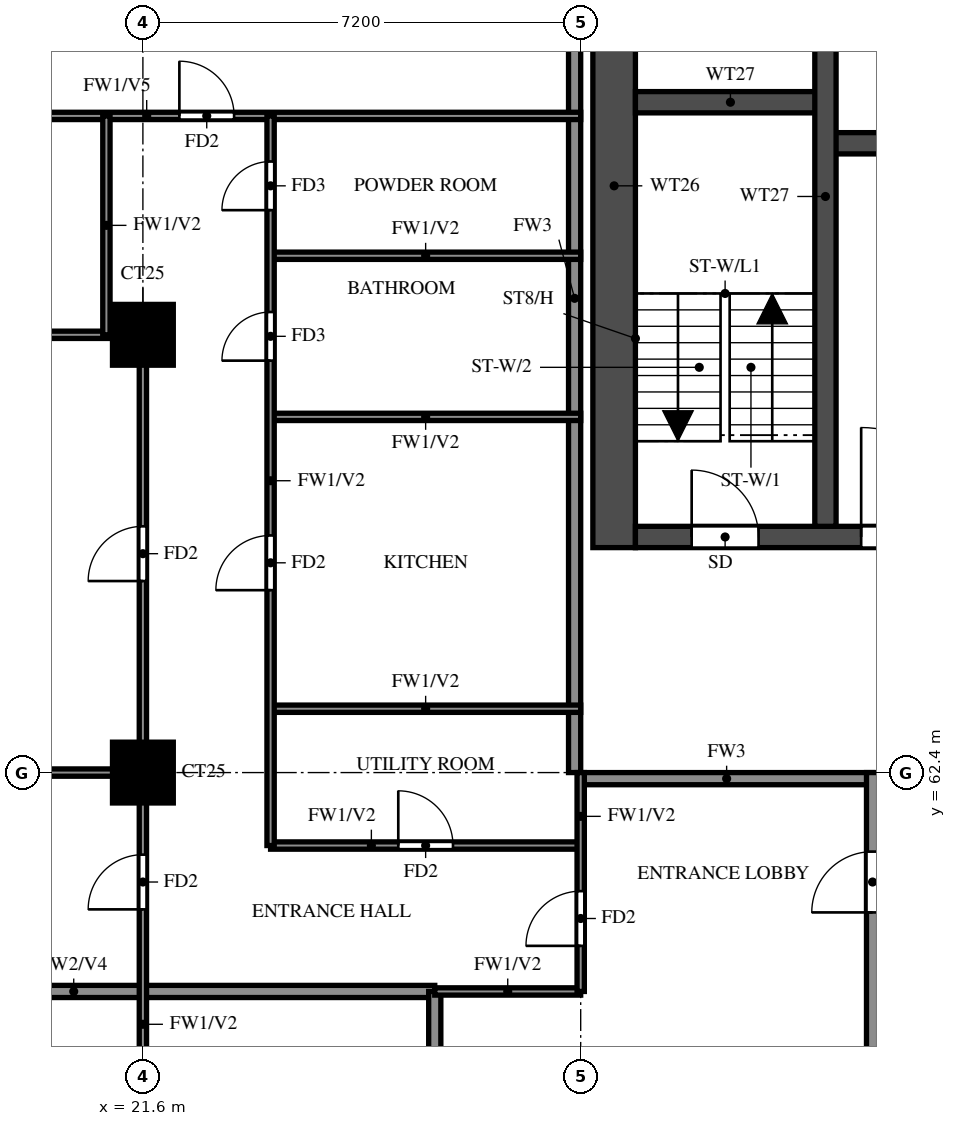
"""IFC4 building model, lengths in metres.
Left out: names, types, materials, properties, quantities, classifications, styles, units other than length and angle.
Written with IfcOpenShell. Run it as: python <this file> out.ifc"""

import sys

from ifc_helpers import new_model, si_unit, direction, frame, frame_2d, origin, origin_2d, place, context, subcontext, project, spatial, rectangle, extrude, source, transform, mapped, element, fill, save


model = new_model("IFC4")
c1 = context("Model", 3, precision=1e-05, world=origin(), true_north=direction((0.0, 1.0)))
c2 = subcontext(c1, "Body", "Model", "MODEL_VIEW")
j1 = project(units=[si_unit("LENGTHUNIT", "METRE"), si_unit("PLANEANGLEUNIT", "RADIAN")], contexts=[c1])
p1 = place(None, origin())
s1 = spatial("IfcSite", under=j1, at=p1, CompositionType="ELEMENT")
p2 = place(p1, origin())
s2 = spatial("IfcBuilding", under=s1, at=p2, CompositionType="ELEMENT")
p3 = place(p2, frame((0.0, 0.0, 160.5)))
s3 = spatial("IfcBuildingStorey", under=s2, at=p3, CompositionType="ELEMENT", Elevation=160.5)
m1 = source(origin(), c2, "Body", "SweptSolid", [
    extrude(rectangle(XDim=1.0, YDim=1.0, at=origin_2d()), origin(), (0.0, 0.0, 1.0), 3.2),
])
for number, where, z_axis, x_axis in (
    (1, (21.6, 62.4, 0.0), (0.0, 0.0, 1.0), (1.0, 0.0, 0.0)),
    (2, (21.6, 69.6, 0.0), (0.0, 0.0, 1.0), (1.0, 0.0, 0.0)),
):
    element("IfcColumn", number, at=place(p3, frame(where, z_axis=z_axis, x_axis=x_axis)), inside=s3, PredefinedType="COLUMN", context=c2, shape_type="MappedRepresentation", body=[
        mapped(m1, transform((0.0, 0.0, 0.0))),
    ])
p4 = place(p3, frame((29.35, 66.1, 0.0), z_axis=(0.0, 0.0, 1.0), x_axis=(0.0, 1.0, 0.0)))
e3 = element("IfcWall", 3, at=p4, inside=s3, PredefinedType="SHEAR", context=c2, shape_type="SweptSolid", body=[
    extrude(rectangle(XDim=11.9, YDim=0.7, at=frame_2d((5.95, 0.0))), origin(), (0.0, 0.0, 1.0), 3.2),
])
p5 = place(p3, frame((29.7, 66.275, 0.0), z_axis=(0.0, 0.0, 1.0), x_axis=(1.0, 0.0, 0.0)))
e4 = element("IfcWall", 4, at=p5, inside=s3, PredefinedType="SHEAR", context=c2, shape_type="SweptSolid", body=[
    extrude(rectangle(XDim=41.4, YDim=0.35, at=frame_2d((20.7, 0.0))), origin(), (0.0, 0.0, 1.0), 3.2),
])
p6 = place(p5, frame((0.925, 0.0, 0.0)))
e5 = element("IfcOpeningElement", 5, at=p6, cuts=e4, PredefinedType="OPENING", context=c2, shape_type="SweptSolid", body=[
    extrude(rectangle(XDim=1.1, YDim=2.1, at=frame_2d((0.55, 1.05))), frame((0.0, 0.185, 0.0), z_axis=(0.0, -1.0, 0.0), x_axis=(1.0, 0.0, 0.0)), (0.0, 0.0, 1.0), 0.37),
])
p7 = place(p5, frame((3.712, 0.0, 0.0)))
e6 = element("IfcOpeningElement", 6, at=p7, cuts=e4, PredefinedType="OPENING", context=c2, shape_type="SweptSolid", body=[
    extrude(rectangle(XDim=1.8, YDim=2.1, at=frame_2d((0.9, 1.05))), frame((0.0, 0.185, 0.0), z_axis=(0.0, -1.0, 0.0), x_axis=(1.0, 0.0, 0.0)), (0.0, 0.0, 1.0), 0.37),
])
p8 = place(p3, frame((32.825, 72.75, 0.0), z_axis=(0.0, 0.0, 1.0), x_axis=(1.0, 0.0, 0.0)))
e7 = element("IfcWall", 7, at=p8, inside=s3, PredefinedType="SHEAR", context=c2, shape_type="SweptSolid", body=[
    extrude(rectangle(XDim=35.15, YDim=0.35, at=frame_2d((17.575, 0.0))), origin(), (0.0, 0.0, 1.0), 3.2),
])
p9 = place(p8, frame((19.8, 0.0, 0.0)))
e8 = element("IfcOpeningElement", 8, at=p9, cuts=e7, PredefinedType="OPENING", context=c2, shape_type="SweptSolid", body=[
    extrude(rectangle(XDim=1.1, YDim=2.1, at=frame_2d((0.55, 1.05))), frame((0.0, 0.185, 0.0), z_axis=(0.0, -1.0, 0.0), x_axis=(1.0, 0.0, 0.0)), (0.0, 0.0, 1.0), 0.37),
])
p10 = place(p8, frame((27.7, 0.0, 0.0)))
e9 = element("IfcOpeningElement", 9, at=p10, cuts=e7, PredefinedType="OPENING", context=c2, shape_type="SweptSolid", body=[
    extrude(rectangle(XDim=1.1, YDim=2.1, at=frame_2d((0.55, 1.05))), frame((0.0, 0.185, 0.0), z_axis=(0.0, -1.0, 0.0), x_axis=(1.0, 0.0, 0.0)), (0.0, 0.0, 1.0), 0.37),
])
p11 = place(p8, frame((30.3, 0.0, 0.0)))
e10 = element("IfcOpeningElement", 10, at=p11, cuts=e7, PredefinedType="OPENING", context=c2, shape_type="SweptSolid", body=[
    extrude(rectangle(XDim=1.1, YDim=2.1, at=frame_2d((0.55, 1.05))), frame((0.0, 0.185, 0.0), z_axis=(0.0, -1.0, 0.0), x_axis=(1.0, 0.0, 0.0)), (0.0, 0.0, 1.0), 0.37),
])
p12 = place(p8, frame((3.8, 0.0, 0.0)))
e11 = element("IfcOpeningElement", 11, at=p12, cuts=e7, PredefinedType="OPENING", context=c2, shape_type="SweptSolid", body=[
    extrude(rectangle(XDim=1.1, YDim=2.1, at=frame_2d((0.55, 1.05))), frame((0.0, 0.185, 0.0), z_axis=(0.0, -1.0, 0.0), x_axis=(1.0, 0.0, 0.0)), (0.0, 0.0, 1.0), 0.37),
])
p13 = place(p8, frame((6.55, 0.0, 0.0)))
e12 = element("IfcOpeningElement", 12, at=p13, cuts=e7, PredefinedType="OPENING", context=c2, shape_type="SweptSolid", body=[
    extrude(rectangle(XDim=1.1, YDim=2.1, at=frame_2d((0.55, 1.05))), frame((0.0, 0.185, 0.0), z_axis=(0.0, -1.0, 0.0), x_axis=(1.0, 0.0, 0.0)), (0.0, 0.0, 1.0), 0.37),
])
p14 = place(p8, frame((9.3, 0.0, 0.0)))
e13 = element("IfcOpeningElement", 13, at=p14, cuts=e7, PredefinedType="OPENING", context=c2, shape_type="SweptSolid", body=[
    extrude(rectangle(XDim=1.1, YDim=2.1, at=frame_2d((0.55, 1.05))), frame((0.0, 0.185, 0.0), z_axis=(0.0, -1.0, 0.0), x_axis=(1.0, 0.0, 0.0)), (0.0, 0.0, 1.0), 0.37),
])
p15 = place(p8, frame((12.05, 0.0, 0.0)))
e14 = element("IfcOpeningElement", 14, at=p15, cuts=e7, PredefinedType="OPENING", context=c2, shape_type="SweptSolid", body=[
    extrude(rectangle(XDim=1.1, YDim=2.1, at=frame_2d((0.55, 1.05))), frame((0.0, 0.185, 0.0), z_axis=(0.0, -1.0, 0.0), x_axis=(1.0, 0.0, 0.0)), (0.0, 0.0, 1.0), 0.37),
])
p16 = place(p8, frame((14.8, 0.0, 0.0)))
e15 = element("IfcOpeningElement", 15, at=p16, cuts=e7, PredefinedType="OPENING", context=c2, shape_type="SweptSolid", body=[
    extrude(rectangle(XDim=1.1, YDim=2.1, at=frame_2d((0.55, 1.05))), frame((0.0, 0.185, 0.0), z_axis=(0.0, -1.0, 0.0), x_axis=(1.0, 0.0, 0.0)), (0.0, 0.0, 1.0), 0.37),
])
p17 = place(p8, frame((17.55, 0.0, 0.0)))
e16 = element("IfcOpeningElement", 16, at=p17, cuts=e7, PredefinedType="OPENING", context=c2, shape_type="SweptSolid", body=[
    extrude(rectangle(XDim=1.1, YDim=2.1, at=frame_2d((0.55, 1.05))), frame((0.0, 0.185, 0.0), z_axis=(0.0, -1.0, 0.0), x_axis=(1.0, 0.0, 0.0)), (0.0, 0.0, 1.0), 0.37),
])
p18 = place(p8, frame((0.938, 0.0, 0.0)))
e17 = element("IfcOpeningElement", 17, at=p18, cuts=e7, PredefinedType="OPENING", context=c2, shape_type="SweptSolid", body=[
    extrude(rectangle(XDim=1.1, YDim=2.1, at=frame_2d((0.55, 1.05))), frame((0.0, 0.185, 0.0), z_axis=(0.0, -1.0, 0.0), x_axis=(1.0, 0.0, 0.0)), (0.0, 0.0, 1.0), 0.37),
])
p19 = place(p3, frame((29.7, 73.425, 0.0), z_axis=(0.0, 0.0, 1.0), x_axis=(1.0, 0.0, 0.0)))
e18 = element("IfcWall", 18, at=p19, inside=s3, PredefinedType="SHEAR", context=c2, shape_type="SweptSolid", body=[
    extrude(rectangle(XDim=3.125, YDim=0.35, at=frame_2d((1.562, 0.0))), origin(), (0.0, 0.0, 1.0), 3.2),
])
p20 = place(p3, frame((32.825, 66.45, 0.0), z_axis=(0.0, 0.0, 1.0), x_axis=(0.0, 1.0, 0.0)))
e19 = element("IfcWall", 19, at=p20, inside=s3, PredefinedType="SHEAR", context=c2, shape_type="SweptSolid", body=[
    extrude(rectangle(XDim=10.85, YDim=0.35, at=frame_2d((5.425, 0.0))), origin(), (0.0, 0.0, 1.0), 3.2),
])
p21 = place(p3, frame((28.8, 62.3, 0.0), z_axis=(0.0, 0.0, 1.0), x_axis=(1.0, 0.0, 0.0)))
e20 = element("IfcWall", 20, at=p21, inside=s3, PredefinedType="SOLIDWALL", context=c2, shape_type="SweptSolid", body=[
    extrude(rectangle(XDim=4.8, YDim=0.2, at=frame_2d((2.4, 0.0))), origin(), (0.0, 0.0, 1.0), 3.2),
])
p22 = place(p3, frame((28.7, 62.4, 0.0), z_axis=(0.0, 0.0, 1.0), x_axis=(0.0, 1.0, 0.0)))
e21 = element("IfcWall", 21, at=p22, inside=s3, PredefinedType="SOLIDWALL", context=c2, shape_type="SweptSolid", body=[
    extrude(rectangle(XDim=15.6, YDim=0.2, at=frame_2d((7.8, 0.0))), origin(), (0.0, 0.0, 1.0), 3.2),
])
p23 = place(p3, frame((33.6, 50.4, 0.0), z_axis=(0.0, 0.0, 1.0), x_axis=(0.0, 1.0, 0.0)))
e22 = element("IfcWall", 22, at=p23, inside=s3, PredefinedType="SOLIDWALL", context=c2, shape_type="SweptSolid", body=[
    extrude(rectangle(XDim=12.0, YDim=0.2, at=frame_2d((6.0, 0.0))), origin(), (0.0, 0.0, 1.0), 3.2),
])
p24 = place(p23, frame((0.7, 0.0, 0.0)))
e23 = element("IfcOpeningElement", 23, at=p24, cuts=e22, PredefinedType="OPENING", context=c2, shape_type="SweptSolid", body=[
    extrude(rectangle(XDim=1.0, YDim=2.1, at=frame_2d((0.5, 1.05))), frame((0.0, 0.11, 0.0), z_axis=(0.0, -1.0, 0.0), x_axis=(1.0, 0.0, 0.0)), (0.0, 0.0, 1.0), 0.22),
])
p25 = place(p23, frame((9.7, 0.0, 0.0)))
e24 = element("IfcOpeningElement", 24, at=p25, cuts=e22, PredefinedType="OPENING", context=c2, shape_type="SweptSolid", body=[
    extrude(rectangle(XDim=1.0, YDim=2.1, at=frame_2d((0.5, 1.05))), frame((0.0, 0.11, 0.0), z_axis=(0.0, -1.0, 0.0), x_axis=(1.0, 0.0, 0.0)), (0.0, 0.0, 1.0), 0.22),
])
p26 = place(p3, frame((14.525, 58.8, 0.0), z_axis=(0.0, 0.0, 1.0), x_axis=(1.0, 0.0, 0.0)))
e25 = element("IfcWall", 25, at=p26, inside=s3, PredefinedType="SOLIDWALL", context=c2, shape_type="SweptSolid", body=[
    extrude(rectangle(XDim=11.875, YDim=0.2, at=frame_2d((5.938, 0.0))), origin(), (0.0, 0.0, 1.0), 2.3),
])
p27 = place(p3, frame((26.4, 56.4, 0.0), z_axis=(0.0, 0.0, 1.0), x_axis=(0.0, 1.0, 0.0)))
e26 = element("IfcWall", 26, at=p27, inside=s3, PredefinedType="SOLIDWALL", context=c2, shape_type="SweptSolid", body=[
    extrude(rectangle(XDim=2.4, YDim=0.2, at=frame_2d((1.2, 0.0))), origin(), (0.0, 0.0, 1.0), 3.2),
])
p28 = place(p3, frame((26.4, 58.8, 0.0), z_axis=(0.0, 0.0, 1.0), x_axis=(1.0, 0.0, 0.0)))
e27 = element("IfcWall", 27, at=p28, inside=s3, PredefinedType="PARTITIONING", context=c2, shape_type="SweptSolid", body=[
    extrude(rectangle(XDim=2.4, YDim=0.12, at=frame_2d((1.2, 0.0))), origin(), (0.0, 0.0, 1.0), 3.2),
])
p29 = place(p3, frame((23.7, 61.2, 0.0), z_axis=(0.0, 0.0, 1.0), x_axis=(1.0, 0.0, 0.0)))
e28 = element("IfcWall", 28, at=p29, inside=s3, PredefinedType="PARTITIONING", context=c2, shape_type="SweptSolid", body=[
    extrude(rectangle(XDim=5.1, YDim=0.12, at=frame_2d((2.55, 0.0))), origin(), (0.0, 0.0, 1.0), 3.2),
])
p30 = place(p29, frame((2.1, 0.0, 0.0)))
e29 = element("IfcOpeningElement", 29, at=p30, cuts=e28, PredefinedType="OPENING", context=c2, shape_type="SweptSolid", body=[
    extrude(rectangle(XDim=0.9, YDim=2.1, at=frame_2d((0.45, 1.05))), frame((0.0, 0.07, 0.0), z_axis=(0.0, -1.0, 0.0), x_axis=(1.0, 0.0, 0.0)), (0.0, 0.0, 1.0), 0.14),
])
p31 = place(p3, frame((14.525, 62.4, 0.0), z_axis=(0.0, 0.0, 1.0), x_axis=(1.0, 0.0, 0.0)))
e30 = element("IfcWall", 30, at=p31, inside=s3, PredefinedType="PARTITIONING", context=c2, shape_type="SweptSolid", body=[
    extrude(rectangle(XDim=7.075, YDim=0.12, at=frame_2d((3.538, 0.0))), origin(), (0.0, 0.0, 1.0), 3.2),
])
for number, where, z_axis, x_axis in (
    (31, (23.7, 63.45, 0.0), (0.0, 0.0, 1.0), (1.0, 0.0, 0.0)),
    (32, (23.7, 68.25, 0.0), (0.0, 0.0, 1.0), (1.0, 0.0, 0.0)),
):
    element("IfcWall", number, at=place(p3, frame(where, z_axis=z_axis, x_axis=x_axis)), inside=s3, PredefinedType="PARTITIONING", context=c2, shape_type="SweptSolid", body=[
        extrude(rectangle(XDim=5.1, YDim=0.12, at=frame_2d((2.55, 0.0))), origin(), (0.0, 0.0, 1.0), 3.2),
    ])
p32 = place(p3, frame((14.525, 69.6, 0.0), z_axis=(0.0, 0.0, 1.0), x_axis=(1.0, 0.0, 0.0)))
e33 = element("IfcWall", 33, at=p32, inside=s3, PredefinedType="PARTITIONING", context=c2, shape_type="SweptSolid", body=[
    extrude(rectangle(XDim=7.075, YDim=0.12, at=frame_2d((3.538, 0.0))), origin(), (0.0, 0.0, 1.0), 3.2),
])
p33 = place(p32, frame((2.837, 0.0, 0.0)))
e34 = element("IfcOpeningElement", 34, at=p33, cuts=e33, PredefinedType="OPENING", context=c2, shape_type="SweptSolid", body=[
    extrude(rectangle(XDim=0.8, YDim=2.1, at=frame_2d((0.4, 1.05))), frame((0.0, 0.07, 0.0), z_axis=(0.0, -1.0, 0.0), x_axis=(1.0, 0.0, 0.0)), (0.0, 0.0, 1.0), 0.14),
])
p34 = place(p3, frame((23.7, 70.9, 0.0), z_axis=(0.0, 0.0, 1.0), x_axis=(1.0, 0.0, 0.0)))
e35 = element("IfcWall", 35, at=p34, inside=s3, PredefinedType="PARTITIONING", context=c2, shape_type="SweptSolid", body=[
    extrude(rectangle(XDim=5.1, YDim=0.12, at=frame_2d((2.55, 0.0))), origin(), (0.0, 0.0, 1.0), 3.2),
])
p35 = place(p3, frame((14.525, 73.2, 0.0), z_axis=(0.0, 0.0, 1.0), x_axis=(1.0, 0.0, 0.0)))
e36 = element("IfcWall", 36, at=p35, inside=s3, PredefinedType="PARTITIONING", context=c2, shape_type="SweptSolid", body=[
    extrude(rectangle(XDim=14.275, YDim=0.12, at=frame_2d((7.138, 0.0))), origin(), (0.0, 0.0, 1.0), 2.3),
])
p36 = place(p35, frame((7.675, 0.0, 0.0)))
e37 = element("IfcOpeningElement", 37, at=p36, cuts=e36, PredefinedType="OPENING", context=c2, shape_type="SweptSolid", body=[
    extrude(rectangle(XDim=0.9, YDim=2.1, at=frame_2d((0.45, 1.05))), frame((0.0, 0.07, 0.0), z_axis=(0.0, -1.0, 0.0), x_axis=(1.0, 0.0, 0.0)), (0.0, 0.0, 1.0), 0.14),
])
p37 = place(p3, frame((21.0, 69.6, 0.0), z_axis=(0.0, 0.0, 1.0), x_axis=(0.0, 1.0, 0.0)))
e38 = element("IfcWall", 38, at=p37, inside=s3, PredefinedType="PARTITIONING", context=c2, shape_type="SweptSolid", body=[
    extrude(rectangle(XDim=3.6, YDim=0.12, at=frame_2d((1.8, 0.0))), origin(), (0.0, 0.0, 1.0), 3.2),
])
p38 = place(p3, frame((21.6, 48.0, 0.0), z_axis=(0.0, 0.0, 1.0), x_axis=(0.0, 1.0, 0.0)))
e39 = element("IfcWall", 39, at=p38, inside=s3, PredefinedType="PARTITIONING", context=c2, shape_type="SweptSolid", body=[
    extrude(rectangle(XDim=21.6, YDim=0.12, at=frame_2d((10.8, 0.0))), origin(), (0.0, 0.0, 1.0), 3.2),
])
p39 = place(p38, frame((2.85, 0.0, 0.0)))
e40 = element("IfcOpeningElement", 40, at=p39, cuts=e39, PredefinedType="OPENING", context=c2, shape_type="SweptSolid", body=[
    extrude(rectangle(XDim=1.5, YDim=2.1, at=frame_2d((0.75, 1.05))), frame((0.0, 0.07, 0.0), z_axis=(0.0, -1.0, 0.0), x_axis=(1.0, 0.0, 0.0)), (0.0, 0.0, 1.0), 0.14),
])
p40 = place(p38, frame((8.55, 0.0, 0.0)))
e41 = element("IfcOpeningElement", 41, at=p40, cuts=e39, PredefinedType="OPENING", context=c2, shape_type="SweptSolid", body=[
    extrude(rectangle(XDim=0.9, YDim=2.1, at=frame_2d((0.45, 1.05))), frame((0.0, 0.07, 0.0), z_axis=(0.0, -1.0, 0.0), x_axis=(1.0, 0.0, 0.0)), (0.0, 0.0, 1.0), 0.14),
])
p41 = place(p38, frame((12.15, 0.0, 0.0)))
e42 = element("IfcOpeningElement", 42, at=p41, cuts=e39, PredefinedType="OPENING", context=c2, shape_type="SweptSolid", body=[
    extrude(rectangle(XDim=0.9, YDim=2.1, at=frame_2d((0.45, 1.05))), frame((0.0, 0.07, 0.0), z_axis=(0.0, -1.0, 0.0), x_axis=(1.0, 0.0, 0.0)), (0.0, 0.0, 1.0), 0.14),
])
p42 = place(p38, frame((17.55, 0.0, 0.0)))
e43 = element("IfcOpeningElement", 43, at=p42, cuts=e39, PredefinedType="OPENING", context=c2, shape_type="SweptSolid", body=[
    extrude(rectangle(XDim=0.9, YDim=2.1, at=frame_2d((0.45, 1.05))), frame((0.0, 0.07, 0.0), z_axis=(0.0, -1.0, 0.0), x_axis=(1.0, 0.0, 0.0)), (0.0, 0.0, 1.0), 0.14),
])
p43 = place(p3, frame((23.7, 61.2, 0.0), z_axis=(0.0, 0.0, 1.0), x_axis=(0.0, 1.0, 0.0)))
e44 = element("IfcWall", 44, at=p43, inside=s3, PredefinedType="PARTITIONING", context=c2, shape_type="SweptSolid", body=[
    extrude(rectangle(XDim=12.0, YDim=0.12, at=frame_2d((6.0, 0.0))), origin(), (0.0, 0.0, 1.0), 3.2),
])
p44 = place(p43, frame((4.2, 0.0, 0.0)))
e45 = element("IfcOpeningElement", 45, at=p44, cuts=e44, PredefinedType="OPENING", context=c2, shape_type="SweptSolid", body=[
    extrude(rectangle(XDim=0.9, YDim=2.1, at=frame_2d((0.45, 1.05))), frame((0.0, 0.07, 0.0), z_axis=(0.0, -1.0, 0.0), x_axis=(1.0, 0.0, 0.0)), (0.0, 0.0, 1.0), 0.14),
])
p45 = place(p43, frame((7.975, 0.0, 0.0)))
e46 = element("IfcOpeningElement", 46, at=p45, cuts=e44, PredefinedType="OPENING", context=c2, shape_type="SweptSolid", body=[
    extrude(rectangle(XDim=0.8, YDim=2.1, at=frame_2d((0.4, 1.05))), frame((0.0, 0.07, 0.0), z_axis=(0.0, -1.0, 0.0), x_axis=(1.0, 0.0, 0.0)), (0.0, 0.0, 1.0), 0.14),
])
p46 = place(p43, frame((10.45, 0.0, 0.0)))
e47 = element("IfcOpeningElement", 47, at=p46, cuts=e44, PredefinedType="OPENING", context=c2, shape_type="SweptSolid", body=[
    extrude(rectangle(XDim=0.8, YDim=2.1, at=frame_2d((0.4, 1.05))), frame((0.0, 0.07, 0.0), z_axis=(0.0, -1.0, 0.0), x_axis=(1.0, 0.0, 0.0)), (0.0, 0.0, 1.0), 0.14),
])
p47 = place(p3, frame((28.8, 58.8, 0.0), z_axis=(0.0, 0.0, 1.0), x_axis=(0.0, 1.0, 0.0)))
e48 = element("IfcWall", 48, at=p47, inside=s3, PredefinedType="PARTITIONING", context=c2, shape_type="SweptSolid", body=[
    extrude(rectangle(XDim=3.6, YDim=0.12, at=frame_2d((1.8, 0.0))), origin(), (0.0, 0.0, 1.0), 3.2),
])
p48 = place(p47, frame((0.75, 0.0, 0.0)))
e49 = element("IfcOpeningElement", 49, at=p48, cuts=e48, PredefinedType="OPENING", context=c2, shape_type="SweptSolid", body=[
    extrude(rectangle(XDim=0.9, YDim=2.1, at=frame_2d((0.45, 1.05))), frame((0.0, 0.07, 0.0), z_axis=(0.0, -1.0, 0.0), x_axis=(1.0, 0.0, 0.0)), (0.0, 0.0, 1.0), 0.14),
])
p49 = place(p6, origin())
e50 = element("IfcDoor", 50, at=p49, inside=s3, OperationType="SINGLE_SWING_LEFT", PredefinedType="DOOR", context=c2, shape_type="SweptSolid", body=[
    extrude(rectangle(XDim=1.1, YDim=2.1, at=frame_2d((0.55, 1.05))), frame((0.0, 0.025, 0.0), z_axis=(0.0, -1.0, 0.0), x_axis=(1.0, 0.0, 0.0)), (0.0, 0.0, 1.0), 0.05),
])
fill(e5, e50)
p50 = place(p7, origin())
e51 = element("IfcDoor", 51, at=p50, inside=s3, OperationType="DOUBLE_DOOR_SINGLE_SWING", PredefinedType="DOOR", context=c2, shape_type="SweptSolid", body=[
    extrude(rectangle(XDim=1.8, YDim=2.1, at=frame_2d((0.9, 1.05))), frame((0.0, 0.025, 0.0), z_axis=(0.0, -1.0, 0.0), x_axis=(1.0, 0.0, 0.0)), (0.0, 0.0, 1.0), 0.05),
])
fill(e6, e51)
p51 = place(p48, origin())
e52 = element("IfcDoor", 52, at=p51, inside=s3, OperationType="SINGLE_SWING_LEFT", PredefinedType="DOOR", context=c2, shape_type="SweptSolid", body=[
    extrude(rectangle(XDim=0.9, YDim=2.1, at=frame_2d((0.45, 1.05))), frame((0.0, 0.025, 0.0), z_axis=(0.0, -1.0, 0.0), x_axis=(1.0, 0.0, 0.0)), (0.0, 0.0, 1.0), 0.05),
])
fill(e49, e52)
p52 = place(p25, origin())
e53 = element("IfcDoor", 53, at=p52, inside=s3, OperationType="SINGLE_SWING_RIGHT", PredefinedType="DOOR", context=c2, shape_type="SweptSolid", body=[
    extrude(rectangle(XDim=1.0, YDim=2.1, at=frame_2d((0.5, 1.05))), frame((0.0, 0.025, 0.0), z_axis=(0.0, -1.0, 0.0), x_axis=(1.0, 0.0, 0.0)), (0.0, 0.0, 1.0), 0.05),
])
fill(e24, e53)
p53 = place(p41, origin())
e54 = element("IfcDoor", 54, at=p53, inside=s3, OperationType="SINGLE_SWING_LEFT", PredefinedType="DOOR", context=c2, shape_type="SweptSolid", body=[
    extrude(rectangle(XDim=0.9, YDim=2.1, at=frame_2d((0.45, 1.05))), frame((0.0, 0.025, 0.0), z_axis=(0.0, -1.0, 0.0), x_axis=(1.0, 0.0, 0.0)), (0.0, 0.0, 1.0), 0.05),
])
fill(e42, e54)
p54 = place(p42, origin())
e55 = element("IfcDoor", 55, at=p54, inside=s3, OperationType="SINGLE_SWING_LEFT", PredefinedType="DOOR", context=c2, shape_type="SweptSolid", body=[
    extrude(rectangle(XDim=0.9, YDim=2.1, at=frame_2d((0.45, 1.05))), frame((0.0, 0.025, 0.0), z_axis=(0.0, -1.0, 0.0), x_axis=(1.0, 0.0, 0.0)), (0.0, 0.0, 1.0), 0.05),
])
fill(e43, e55)
p55 = place(p36, origin())
e56 = element("IfcDoor", 56, at=p55, inside=s3, OperationType="SINGLE_SWING_LEFT", PredefinedType="DOOR", context=c2, shape_type="SweptSolid", body=[
    extrude(rectangle(XDim=0.9, YDim=2.1, at=frame_2d((0.45, 1.05))), frame((0.0, 0.025, 0.0), z_axis=(0.0, -1.0, 0.0), x_axis=(1.0, 0.0, 0.0)), (0.0, 0.0, 1.0), 0.05),
])
fill(e37, e56)
p56 = place(p30, origin())
e57 = element("IfcDoor", 57, at=p56, inside=s3, OperationType="SINGLE_SWING_LEFT", PredefinedType="DOOR", context=c2, shape_type="SweptSolid", body=[
    extrude(rectangle(XDim=0.9, YDim=2.1, at=frame_2d((0.45, 1.05))), frame((0.0, 0.025, 0.0), z_axis=(0.0, -1.0, 0.0), x_axis=(1.0, 0.0, 0.0)), (0.0, 0.0, 1.0), 0.05),
])
fill(e29, e57)
p57 = place(p44, origin())
e58 = element("IfcDoor", 58, at=p57, inside=s3, OperationType="SINGLE_SWING_RIGHT", PredefinedType="DOOR", context=c2, shape_type="SweptSolid", body=[
    extrude(rectangle(XDim=0.9, YDim=2.1, at=frame_2d((0.45, 1.05))), frame((0.0, 0.025, 0.0), z_axis=(0.0, -1.0, 0.0), x_axis=(1.0, 0.0, 0.0)), (0.0, 0.0, 1.0), 0.05),
])
fill(e45, e58)
p58 = place(p45, origin())
e59 = element("IfcDoor", 59, at=p58, inside=s3, OperationType="SINGLE_SWING_LEFT", PredefinedType="DOOR", context=c2, shape_type="SweptSolid", body=[
    extrude(rectangle(XDim=0.8, YDim=2.1, at=frame_2d((0.4, 1.05))), frame((0.0, 0.025, 0.0), z_axis=(0.0, -1.0, 0.0), x_axis=(1.0, 0.0, 0.0)), (0.0, 0.0, 1.0), 0.05),
])
fill(e46, e59)
p59 = place(p46, origin())
e60 = element("IfcDoor", 60, at=p59, inside=s3, OperationType="SINGLE_SWING_LEFT", PredefinedType="DOOR", context=c2, shape_type="SweptSolid", body=[
    extrude(rectangle(XDim=0.8, YDim=2.1, at=frame_2d((0.4, 1.05))), frame((0.0, 0.025, 0.0), z_axis=(0.0, -1.0, 0.0), x_axis=(1.0, 0.0, 0.0)), (0.0, 0.0, 1.0), 0.05),
])
fill(e47, e60)
save(model, sys.argv[1])
